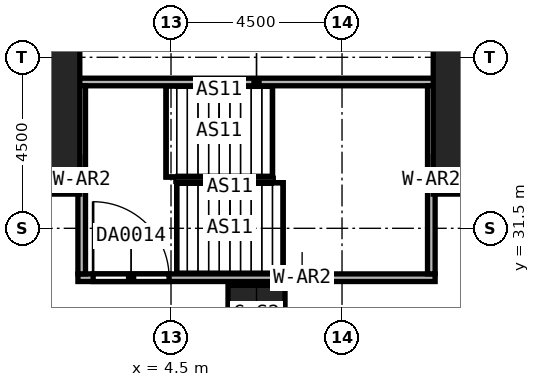
"""IFC4 building model, lengths in metres.
Left out: names, types, materials, properties, quantities, classifications, styles, units other than length and angle.
Written with IfcOpenShell. Run it as: python <this file> out.ifc"""

import sys

from ifc_helpers import new_model, si_unit, direction, frame, frame_2d, origin, origin_2d, place, context, subcontext, project, spatial, rectangle, extrude, element, fill, save


model = new_model("IFC4")
c1 = context("Model", 3, precision=1e-05, world=origin(), true_north=direction((0.0, 1.0)))
c2 = subcontext(c1, "Body", "Model", "MODEL_VIEW")
j1 = project(units=[si_unit("LENGTHUNIT", "METRE"), si_unit("PLANEANGLEUNIT", "RADIAN")], contexts=[c1])
p1 = place(None, origin())
s1 = spatial("IfcSite", under=j1, at=p1, CompositionType="ELEMENT")
p2 = place(p1, origin())
s2 = spatial("IfcBuilding", under=s1, at=p2, CompositionType="ELEMENT")
p3 = place(p2, frame((0.0, 0.0, 12.0)))
s3 = spatial("IfcBuildingStorey", under=s2, at=p3, CompositionType="ELEMENT", Elevation=12.0)
for number, where, z_axis, x_axis in (
    (1, (0.0, 35.7, 0.0), (0.0, 0.0, 1.0), (1.0, 0.0, 0.0)),
    (2, (13.5, 35.7, 0.0), (0.0, 0.0, 1.0), (1.0, 0.0, 0.0)),
):
    element("IfcColumn", number, at=place(p3, frame(where, z_axis=z_axis, x_axis=x_axis)), inside=s3, PredefinedType="COLUMN", context=c2, shape_type="SweptSolid", body=[
        extrude(rectangle(XDim=4.2, YDim=6.6, at=origin_2d()), origin(), (0.0, 0.0, 1.0), 7.0),
    ])
p4 = place(p3, frame((6.75, 29.25, 0.0), z_axis=(0.0, 0.0, 1.0), x_axis=(1.0, 0.0, 0.0)))
e3 = element("IfcColumn", 3, at=p4, inside=s3, PredefinedType="COLUMN", context=c2, shape_type="SweptSolid", body=[
    extrude(rectangle(XDim=1.5, YDim=1.5, at=origin_2d()), origin(), (0.0, 0.0, 1.0), 7.0),
])
p5 = place(p3, frame((2.05, 30.2, 0.0), z_axis=(0.0, 0.0, 1.0), x_axis=(1.0, 0.0, 0.0)))
e4 = element("IfcWall", 4, at=p5, inside=s3, PredefinedType="SOLIDWALL", context=c2, shape_type="SweptSolid", body=[
    extrude(rectangle(XDim=9.4, YDim=0.2, at=frame_2d((4.7, 0.0))), origin(), (0.0, 0.0, 1.0), 7.0),
])
p6 = place(p5, frame((0.4, 0.0, 0.0)))
e5 = element("IfcOpeningElement", 5, at=p6, cuts=e4, PredefinedType="OPENING", context=c2, shape_type="SweptSolid", body=[
    extrude(rectangle(XDim=2.0, YDim=2.4, at=frame_2d((1.0, 1.2))), frame((0.0, 0.1, 0.0), z_axis=(0.0, -1.0, 0.0), x_axis=(1.0, 0.0, 0.0)), (0.0, 0.0, 1.0), 0.2),
])
p7 = place(p3, frame((2.05, 35.35, 0.0), z_axis=(0.0, 0.0, 1.0), x_axis=(1.0, 0.0, 0.0)))
e6 = element("IfcWall", 6, at=p7, inside=s3, PredefinedType="SOLIDWALL", context=c2, shape_type="SweptSolid", body=[
    extrude(rectangle(XDim=9.4, YDim=0.2, at=frame_2d((4.7, 0.0))), origin(), (0.0, 0.0, 1.0), 7.0),
])
for number, where, z_axis, x_axis in (
    (7, (2.15, 30.3, 0.0), (0.0, 0.0, 1.0), (0.0, 1.0, 0.0)),
    (8, (11.35, 30.3, 0.0), (0.0, 0.0, 1.0), (0.0, 1.0, 0.0)),
):
    element("IfcWall", number, at=place(p3, frame(where, z_axis=z_axis, x_axis=x_axis)), inside=s3, PredefinedType="SOLIDWALL", context=c2, shape_type="SweptSolid", body=[
        extrude(rectangle(XDim=4.95, YDim=0.2, at=frame_2d((2.475, 0.0))), origin(), (0.0, 0.0, 1.0), 7.0),
    ])
p8 = place(p6, origin())
e9 = element("IfcDoor", 9, at=p8, inside=s3, OperationType="DOUBLE_DOOR_SINGLE_SWING", PredefinedType="DOOR", context=c2, shape_type="SweptSolid", body=[
    extrude(rectangle(XDim=2.0, YDim=2.4, at=frame_2d((1.0, 1.2))), frame((0.0, 0.025, 0.0), z_axis=(0.0, -1.0, 0.0), x_axis=(1.0, 0.0, 0.0)), (0.0, 0.0, 1.0), 0.05),
])
fill(e5, e9)
save(model, sys.argv[1])
